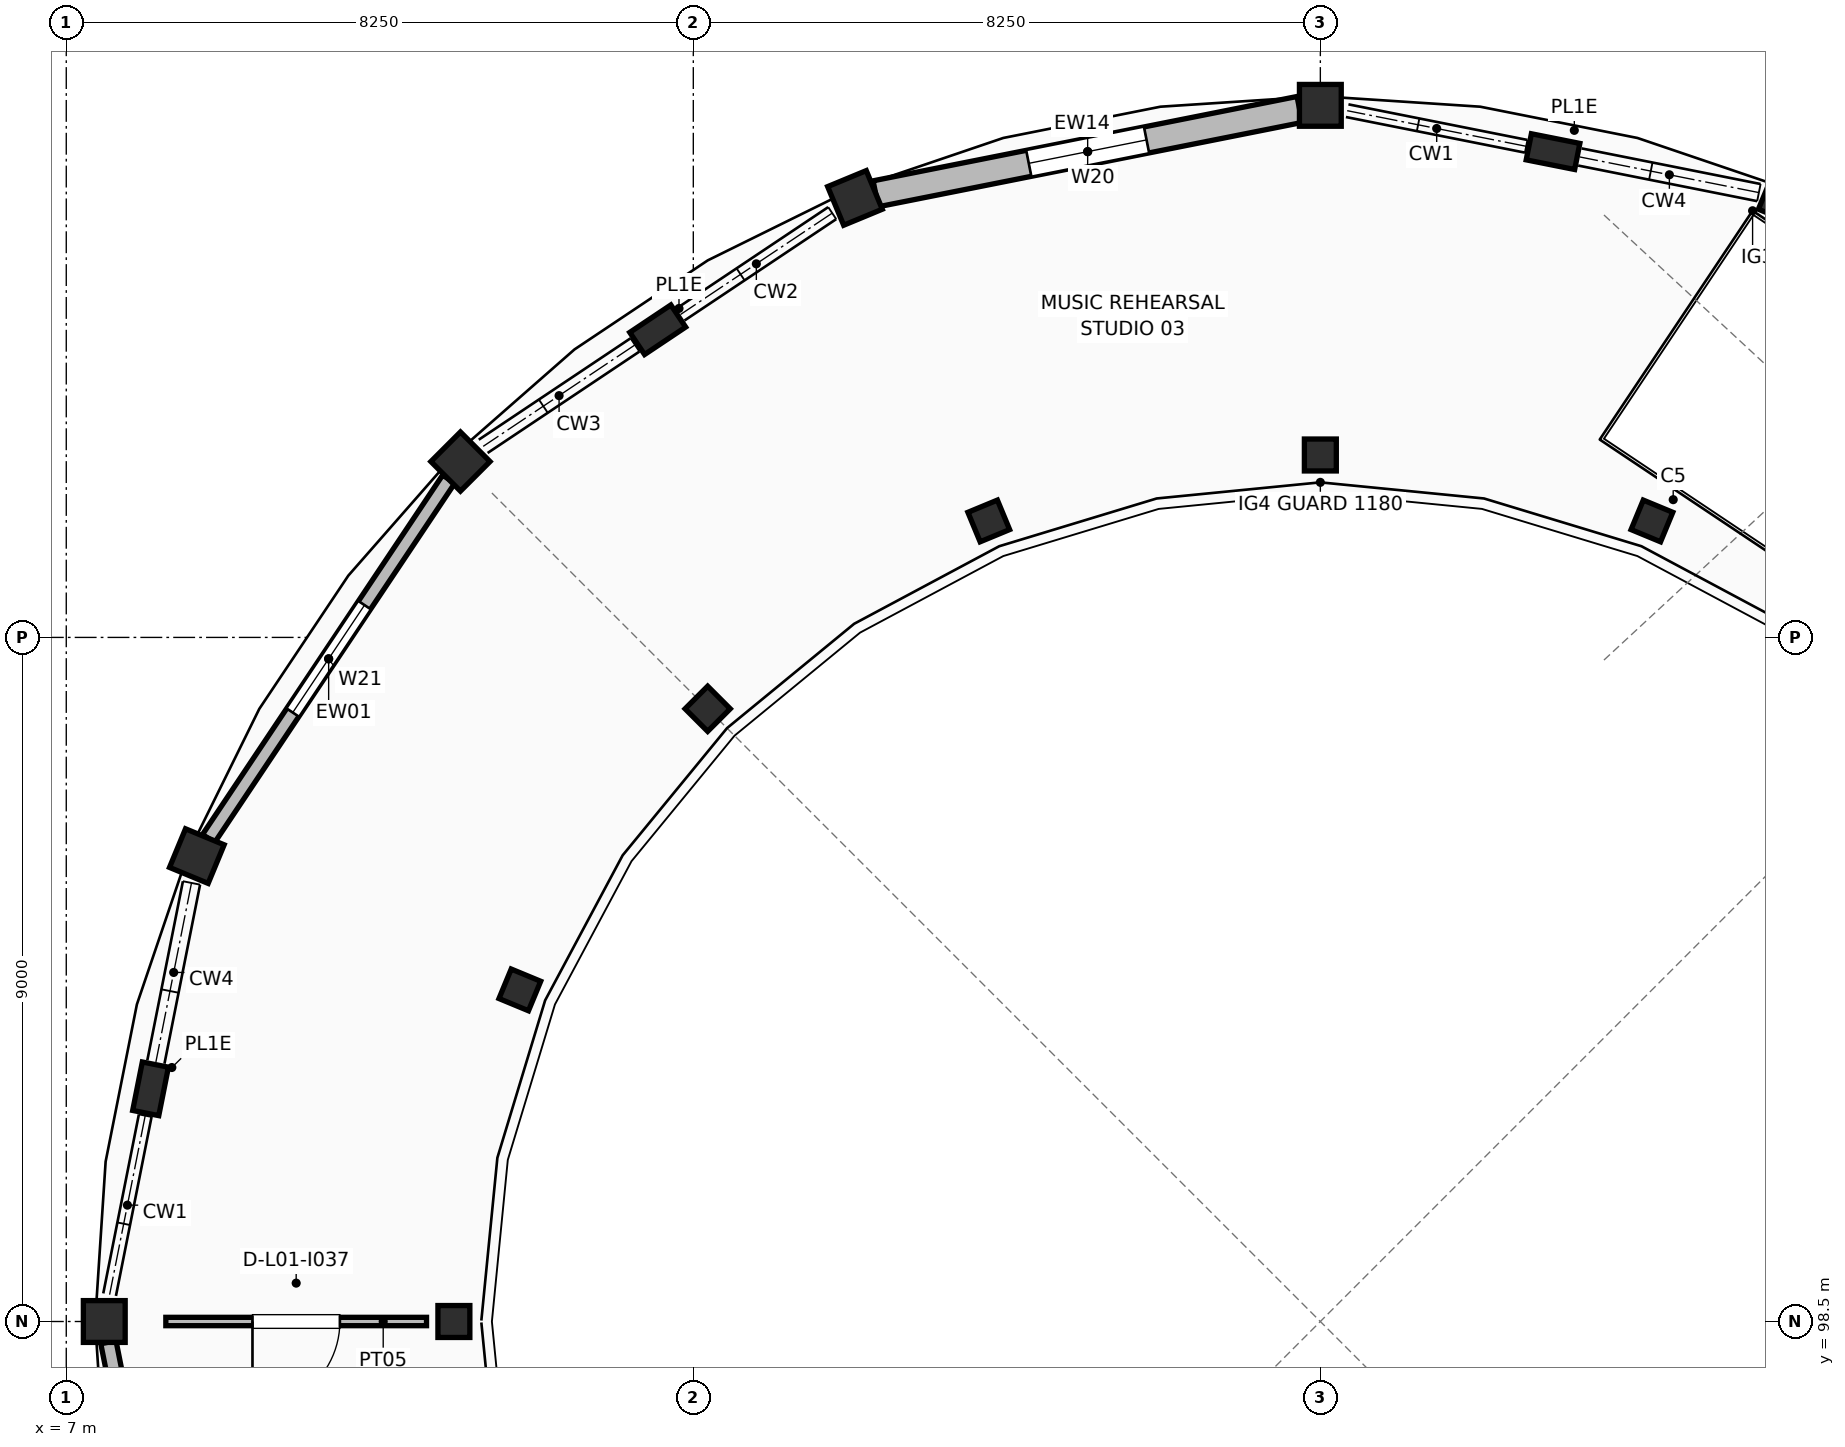
"""IFC4 building model, lengths in metres.
Left out: names, types, materials, properties, quantities, classifications, styles, units other than length and angle.
Written with IfcOpenShell. Run it as: python <this file> out.ifc"""

import sys

from ifc_helpers import new_model, si_unit, direction, frame, frame_2d, origin, origin_2d, place, context, subcontext, project, spatial, rectangle, extrude, element, fill, save


model = new_model("IFC4")
c1 = context("Model", 3, precision=1e-05, world=origin(), true_north=direction((0.0, 1.0)))
c2 = subcontext(c1, "Body", "Model", "MODEL_VIEW")
j1 = project(units=[si_unit("LENGTHUNIT", "METRE"), si_unit("PLANEANGLEUNIT", "RADIAN")], contexts=[c1])
p1 = place(None, origin())
s1 = spatial("IfcSite", under=j1, at=p1, CompositionType="ELEMENT")
p2 = place(p1, origin())
s2 = spatial("IfcBuilding", under=s1, at=p2, CompositionType="ELEMENT")
p3 = place(p2, frame((0.0, 0.0, 4.42)))
s3 = spatial("IfcBuildingStorey", under=s2, at=p3, CompositionType="ELEMENT", Elevation=4.42)
p4 = place(p3, frame((27.863, 109.032, 0.0), z_axis=(0.0, 0.0, 1.0), x_axis=(0.382683432365, 0.923879532511, 0.0)))
e1 = element("IfcColumn", 1, at=p4, inside=s3, PredefinedType="COLUMN", context=c2, shape_type="SweptSolid", body=[
    extrude(rectangle(XDim=0.42, YDim=0.42, at=origin_2d()), origin(), (0.0, 0.0, 1.0), 3.74),
])
p5 = place(p3, frame((29.623, 113.282, 0.0), z_axis=(0.0, 0.0, 1.0), x_axis=(0.382683432365, 0.923879532511, 0.0)))
e2 = element("IfcColumn", 2, at=p5, inside=s3, PredefinedType="COLUMN", context=c2, shape_type="SweptSolid", body=[
    extrude(rectangle(XDim=0.55, YDim=0.55, at=origin_2d()), origin(), (0.0, 0.0, 1.0), 3.74),
])
p6 = place(p3, frame((23.5, 109.9, 0.0), z_axis=(0.0, 0.0, 1.0), x_axis=(0.0, 1.0, 0.0)))
e3 = element("IfcColumn", 3, at=p6, inside=s3, PredefinedType="COLUMN", context=c2, shape_type="SweptSolid", body=[
    extrude(rectangle(XDim=0.42, YDim=0.42, at=origin_2d()), origin(), (0.0, 0.0, 1.0), 3.74),
])
p7 = place(p3, frame((23.5, 114.5, 0.0), z_axis=(0.0, 0.0, 1.0), x_axis=(0.0, 1.0, 0.0)))
e4 = element("IfcColumn", 4, at=p7, inside=s3, PredefinedType="COLUMN", context=c2, shape_type="SweptSolid", body=[
    extrude(rectangle(XDim=0.55, YDim=0.55, at=origin_2d()), origin(), (0.0, 0.0, 1.0), 3.74),
])
p8 = place(p3, frame((19.137, 109.032, 0.0), z_axis=(0.0, 0.0, 1.0), x_axis=(-0.382683432365, 0.923879532511, 0.0)))
e5 = element("IfcColumn", 5, at=p8, inside=s3, PredefinedType="COLUMN", context=c2, shape_type="SweptSolid", body=[
    extrude(rectangle(XDim=0.42, YDim=0.42, at=origin_2d()), origin(), (0.0, 0.0, 1.0), 3.74),
])
p9 = place(p3, frame((17.377, 113.282, 0.0), z_axis=(0.0, 0.0, 1.0), x_axis=(-0.382683432365, 0.923879532511, 0.0)))
e6 = element("IfcColumn", 6, at=p9, inside=s3, PredefinedType="COLUMN", context=c2, shape_type="SweptSolid", body=[
    extrude(rectangle(XDim=0.55, YDim=0.55, at=origin_2d()), origin(), (0.0, 0.0, 1.0), 3.74),
])
p10 = place(p3, frame((15.439, 106.561, 0.0), z_axis=(0.0, 0.0, 1.0), x_axis=(-0.707106781187, 0.707106781187, 0.0)))
e7 = element("IfcColumn", 7, at=p10, inside=s3, PredefinedType="COLUMN", context=c2, shape_type="SweptSolid", body=[
    extrude(rectangle(XDim=0.42, YDim=0.42, at=origin_2d()), origin(), (0.0, 0.0, 1.0), 3.74),
])
p11 = place(p3, frame((12.186, 109.814, 0.0), z_axis=(0.0, 0.0, 1.0), x_axis=(-0.707106781187, 0.707106781187, 0.0)))
e8 = element("IfcColumn", 8, at=p11, inside=s3, PredefinedType="COLUMN", context=c2, shape_type="SweptSolid", body=[
    extrude(rectangle(XDim=0.55, YDim=0.55, at=origin_2d()), origin(), (0.0, 0.0, 1.0), 3.74),
])
p12 = place(p3, frame((12.968, 102.863, 0.0), z_axis=(0.0, 0.0, 1.0), x_axis=(-0.923879532511, 0.382683432365, 0.0)))
e9 = element("IfcColumn", 9, at=p12, inside=s3, PredefinedType="COLUMN", context=c2, shape_type="SweptSolid", body=[
    extrude(rectangle(XDim=0.42, YDim=0.42, at=origin_2d()), origin(), (0.0, 0.0, 1.0), 3.74),
])
p13 = place(p3, frame((8.718, 104.623, 0.0), z_axis=(0.0, 0.0, 1.0), x_axis=(-0.923879532511, 0.382683432365, 0.0)))
e10 = element("IfcColumn", 10, at=p13, inside=s3, PredefinedType="COLUMN", context=c2, shape_type="SweptSolid", body=[
    extrude(rectangle(XDim=0.55, YDim=0.55, at=origin_2d()), origin(), (0.0, 0.0, 1.0), 3.74),
])
p14 = place(p3, frame((12.1, 98.5, 0.0), z_axis=(0.0, 0.0, 1.0), x_axis=(-1.0, 0.0, 0.0)))
e11 = element("IfcColumn", 11, at=p14, inside=s3, PredefinedType="COLUMN", context=c2, shape_type="SweptSolid", body=[
    extrude(rectangle(XDim=0.42, YDim=0.42, at=origin_2d()), origin(), (0.0, 0.0, 1.0), 3.74),
])
p15 = place(p3, frame((7.5, 98.5, 0.0), z_axis=(0.0, 0.0, 1.0), x_axis=(-1.0, 0.0, 0.0)))
e12 = element("IfcColumn", 12, at=p15, inside=s3, PredefinedType="COLUMN", context=c2, shape_type="SweptSolid", body=[
    extrude(rectangle(XDim=0.55, YDim=0.55, at=origin_2d()), origin(), (0.0, 0.0, 1.0), 3.74),
])
for number, where, z_axis, x_axis in (
    (13, (26.562, 113.891, 0.0), (0.0, 0.0, 1.0), (0.195, 0.981, 0.0)),
    (14, (14.782, 111.548, 0.0), (0.0, 0.0, 1.0), (-0.556, 0.831, 0.0)),
    (15, (8.109, 101.562, 0.0), (0.0, 0.0, 1.0), (-0.981, 0.195, 0.0)),
):
    element("IfcColumn", number, at=place(p3, frame(where, z_axis=z_axis, x_axis=x_axis)), inside=s3, PredefinedType="PILASTER", context=c2, shape_type="SweptSolid", body=[
        extrude(rectangle(XDim=0.35, YDim=0.65, at=origin_2d()), origin(), (0.0, 0.0, 1.0), 3.74),
    ])
p16 = place(p3, frame((23.227, 114.446, 0.0), z_axis=(0.0, 0.0, 1.0), x_axis=(-0.980788171306, -0.195075787902, 0.0)))
e16 = element("IfcWall", 16, at=p16, inside=s3, PredefinedType="STANDARD", context=c2, shape_type="SweptSolid", body=[
    extrude(rectangle(XDim=5.687, YDim=0.348, at=frame_2d((2.844, 0.0))), origin(), (0.0, 0.0, 1.0), 2.78),
])
p17 = place(p16, frame((2.053, 0.0, 0.95)))
e17 = element("IfcOpeningElement", 17, at=p17, cuts=e16, PredefinedType="OPENING", context=c2, shape_type="SweptSolid", body=[
    extrude(rectangle(XDim=1.58, YDim=1.6, at=frame_2d((0.79, 0.8))), frame((0.0, 0.184, 0.0), z_axis=(0.0, -1.0, 0.0), x_axis=(1.0, 0.0, 0.0)), (0.0, 0.0, 1.0), 0.368),
])
p18 = place(p3, frame((12.032, 109.583, 0.0), z_axis=(0.0, 0.0, 1.0), x_axis=(-0.555561808177, -0.831475241541, 0.0)))
e18 = element("IfcWall", 18, at=p18, inside=s3, PredefinedType="STANDARD", context=c2, shape_type="SweptSolid", body=[
    extrude(rectangle(XDim=5.687, YDim=0.192, at=frame_2d((2.844, 0.0))), origin(), (0.0, 0.0, 1.0), 2.78),
])
p19 = place(p18, frame((1.993, 0.0, 0.95)))
e19 = element("IfcOpeningElement", 19, at=p19, cuts=e18, PredefinedType="OPENING", context=c2, shape_type="SweptSolid", body=[
    extrude(rectangle(XDim=1.7, YDim=1.15, at=frame_2d((0.85, 0.575))), frame((0.0, 0.106, 0.0), z_axis=(0.0, -1.0, 0.0), x_axis=(1.0, 0.0, 0.0)), (0.0, 0.0, 1.0), 0.212),
])
p20 = place(p3, frame((7.554, 98.227, 0.0), z_axis=(0.0, 0.0, 1.0), x_axis=(0.195075787902, -0.980788171306, 0.0)))
e20 = element("IfcWall", 20, at=p20, inside=s3, PredefinedType="STANDARD", context=c2, shape_type="SweptSolid", body=[
    extrude(rectangle(XDim=5.687, YDim=0.204, at=frame_2d((2.844, 0.0))), origin(), (0.0, 0.0, 1.0), 2.78),
])
p21 = place(p20, frame((1.993, 0.0, 0.95)))
e21 = element("IfcOpeningElement", 21, at=p21, cuts=e20, PredefinedType="OPENING", context=c2, shape_type="SweptSolid", body=[
    extrude(rectangle(XDim=1.7, YDim=1.3, at=frame_2d((0.85, 0.65))), frame((0.0, 0.112, 0.0), z_axis=(0.0, -1.0, 0.0), x_axis=(1.0, 0.0, 0.0)), (0.0, 0.0, 1.0), 0.224),
])
p22 = place(p3, frame((11.74, 98.5, 0.0), z_axis=(0.0, 0.0, 1.0), x_axis=(-1.0, 0.0, 0.0)))
e22 = element("IfcWall", 22, at=p22, inside=s3, PredefinedType="PARTITIONING", context=c2, shape_type="SweptSolid", body=[
    extrude(rectangle(XDim=3.43, YDim=0.11, at=frame_2d((1.715, 0.0))), origin(), (0.0, 0.0, 1.0), 2.75),
])
p23 = place(p22, frame((1.14, 0.0, 0.0)))
e23 = element("IfcOpeningElement", 23, at=p23, cuts=e22, PredefinedType="OPENING", context=c2, shape_type="SweptSolid", body=[
    extrude(rectangle(XDim=1.15, YDim=2.12, at=frame_2d((0.575, 1.06))), frame((0.0, 0.065, 0.0), z_axis=(0.0, -1.0, 0.0), x_axis=(1.0, 0.0, 0.0)), (0.0, 0.0, 1.0), 0.13),
])
p24 = place(p17, origin())
e24 = element("IfcWindow", 24, at=p24, inside=s3, PartitioningType="SINGLE_PANEL", PredefinedType="WINDOW", context=c2, shape_type="SweptSolid", body=[
    extrude(rectangle(XDim=1.58, YDim=1.6, at=frame_2d((0.79, 0.8))), frame((0.0, 0.03, 0.0), z_axis=(0.0, -1.0, 0.0), x_axis=(1.0, 0.0, 0.0)), (0.0, 0.0, 1.0), 0.06),
])
fill(e17, e24)
p25 = place(p19, origin())
e25 = element("IfcWindow", 25, at=p25, inside=s3, PartitioningType="SINGLE_PANEL", PredefinedType="WINDOW", context=c2, shape_type="SweptSolid", body=[
    extrude(rectangle(XDim=1.7, YDim=1.15, at=frame_2d((0.85, 0.575))), frame((0.0, 0.03, 0.0), z_axis=(0.0, -1.0, 0.0), x_axis=(1.0, 0.0, 0.0)), (0.0, 0.0, 1.0), 0.06),
])
fill(e19, e25)
p26 = place(p23, frame((1.15, 0.0, 0.0), z_axis=(0.0, 0.0, 1.0), x_axis=(-1.0, 0.0, 0.0)))
e26 = element("IfcDoor", 26, at=p26, inside=s3, OperationType="SINGLE_SWING_RIGHT", PredefinedType="DOOR", context=c2, shape_type="SweptSolid", body=[
    extrude(rectangle(XDim=1.15, YDim=2.12, at=frame_2d((0.575, 1.06))), frame((0.0, 0.025, 0.0), z_axis=(0.0, -1.0, 0.0), x_axis=(1.0, 0.0, 0.0)), (0.0, 0.0, 1.0), 0.05),
])
fill(e23, e26)
save(model, sys.argv[1])
